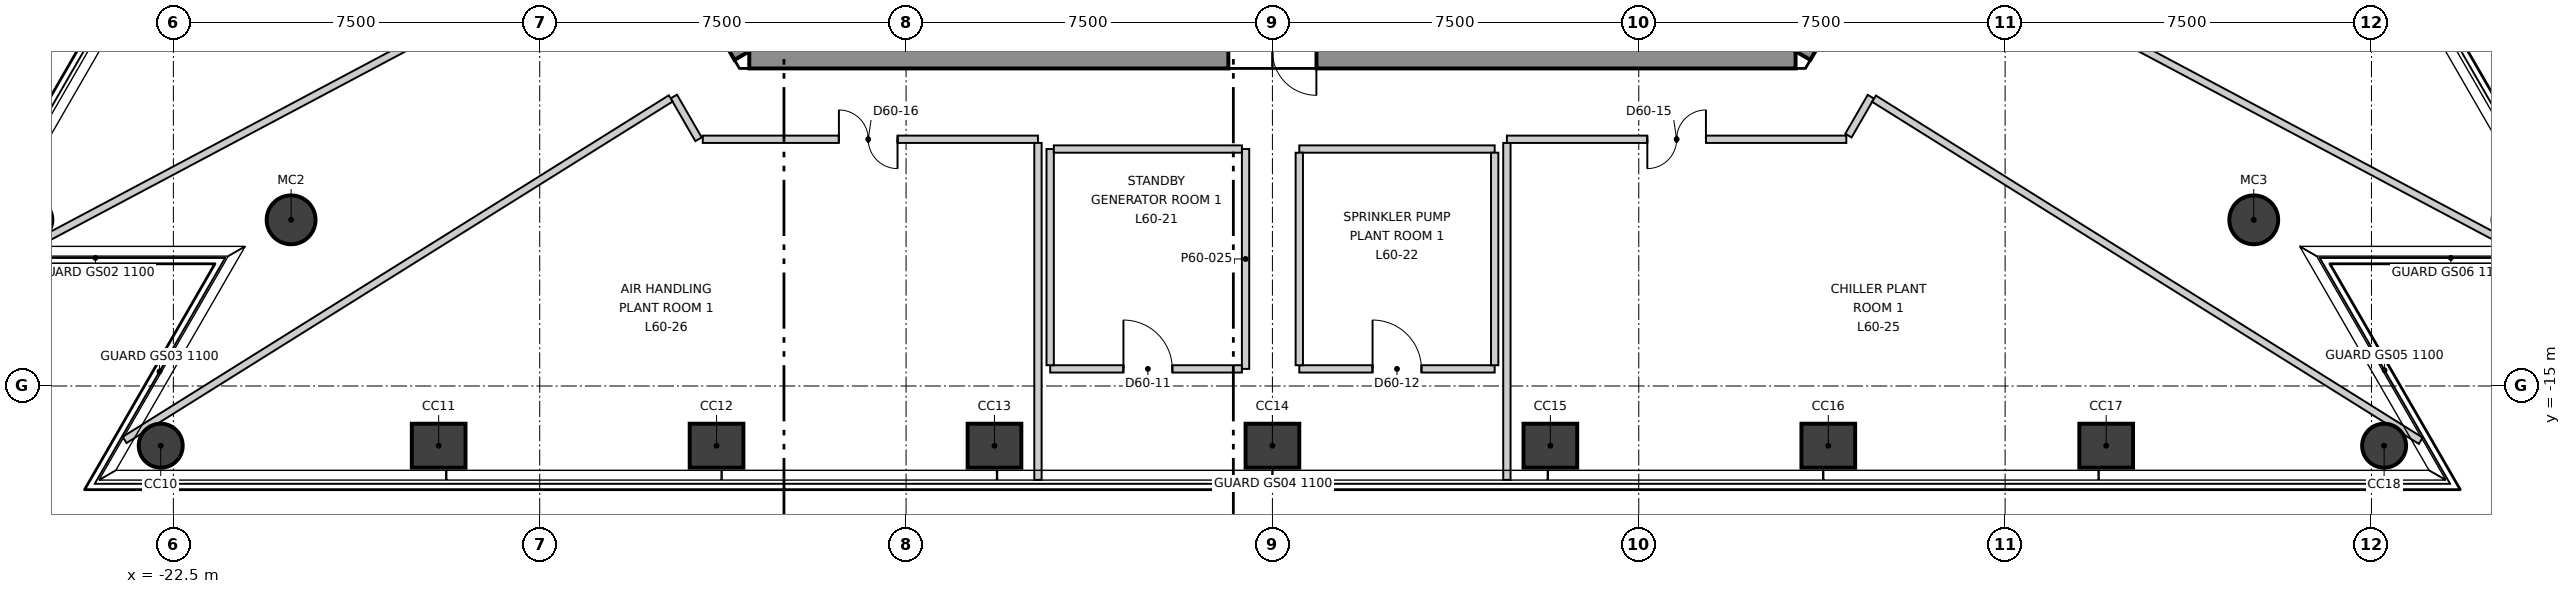
"""IFC4 building model, lengths in metres.
Left out: names, types, materials, properties, quantities, classifications, styles, units other than length and angle.
Written with IfcOpenShell. Run it as: python <this file> out.ifc"""

import sys

from ifc_helpers import new_model, si_unit, direction, frame, frame_2d, origin, origin_2d, place, context, subcontext, project, spatial, polyline, rectangle, circle, outline, extrude, element, fill, save


model = new_model("IFC4")
c1 = context("Model", 3, precision=1e-05, world=origin(), true_north=direction((0.0, 1.0)))
c2 = subcontext(c1, "Body", "Model", "MODEL_VIEW")
j1 = project(units=[si_unit("LENGTHUNIT", "METRE"), si_unit("PLANEANGLEUNIT", "RADIAN")], contexts=[c1])
p1 = place(None, origin())
s1 = spatial("IfcSite", under=j1, at=p1, CompositionType="ELEMENT")
p2 = place(p1, origin())
s2 = spatial("IfcBuilding", under=s1, at=p2, CompositionType="ELEMENT")
p3 = place(p2, frame((0.0, 0.0, 255.8)))
s3 = spatial("IfcBuildingStorey", under=s2, at=p3, CompositionType="ELEMENT", Elevation=255.8)
p4 = place(p3, frame((-12.413, -5.2, -0.6), z_axis=(0.0, 0.0, 1.0), x_axis=(0.49999337185, -0.866029230515, 0.0)))
e1 = element("IfcWall", 1, at=p4, inside=s3, PredefinedType="SHEAR", context=c2, shape_type="SweptSolid", body=[
    extrude(outline(polyline([(-0.202, -0.35), (1.703, -0.35), (3.608, -0.35), (3.204, 0.35), (1.703, 0.35), (0.202, 0.35), (-0.202, -0.35)])), origin(), (0.0, 0.0, 1.0), 6.3),
])
p5 = place(p4, frame((1.553, 0.0, 0.6)))
e2 = element("IfcOpeningElement", 2, at=p5, cuts=e1, PredefinedType="OPENING", context=c2, shape_type="SweptSolid", body=[
    extrude(rectangle(XDim=1.4, YDim=2.1, at=frame_2d((0.7, 1.05))), frame((0.0, 0.36, 0.0), z_axis=(0.0, -1.0, 0.0), x_axis=(1.0, 0.0, 0.0)), (0.0, 0.0, 1.0), 0.72),
])
p6 = place(p3, frame((-10.71, -8.15, -0.6), z_axis=(0.0, 0.0, 1.0), x_axis=(1.0, 0.0, 0.0)))
e3 = element("IfcWall", 3, at=p6, inside=s3, PredefinedType="SHEAR", context=c2, shape_type="SweptSolid", body=[
    extrude(outline(polyline([(-0.202, -0.35), (1.782, -0.35), (3.766, -0.35), (5.75, -0.35), (7.734, -0.35), (9.718, -0.35), (11.702, -0.35), (13.686, -0.35), (15.67, -0.35), (17.654, -0.35), (19.638, -0.35), (21.622, -0.35), (21.218, 0.35), (19.307, 0.35), (17.397, 0.35), (15.486, 0.35), (13.576, 0.35), (11.665, 0.35), (9.755, 0.35), (7.844, 0.35), (5.934, 0.35), (4.023, 0.35), (2.113, 0.35), (0.202, 0.35), (-0.202, -0.35)])), origin(), (0.0, 0.0, 1.0), 6.3),
])
p7 = place(p6, frame((9.81, 0.0, 0.6)))
e4 = element("IfcOpeningElement", 4, at=p7, cuts=e3, PredefinedType="OPENING", context=c2, shape_type="SweptSolid", body=[
    extrude(rectangle(XDim=1.8, YDim=2.1, at=frame_2d((0.9, 1.05))), frame((0.0, 0.36, 0.0), z_axis=(0.0, -1.0, 0.0), x_axis=(1.0, 0.0, 0.0)), (0.0, 0.0, 1.0), 0.72),
])
p8 = place(p3, frame((10.71, -8.15, -0.6), z_axis=(0.0, 0.0, 1.0), x_axis=(0.49999337185, 0.866029230515, 0.0)))
e5 = element("IfcWall", 5, at=p8, inside=s3, PredefinedType="SHEAR", context=c2, shape_type="SweptSolid", body=[
    extrude(outline(polyline([(-0.202, -0.35), (1.703, -0.35), (3.608, -0.35), (3.204, 0.35), (1.703, 0.35), (0.202, 0.35), (-0.202, -0.35)])), origin(), (0.0, 0.0, 1.0), 6.3),
])
p9 = place(p8, frame((1.553, 0.0, 0.6)))
e6 = element("IfcOpeningElement", 6, at=p9, cuts=e5, PredefinedType="OPENING", context=c2, shape_type="SweptSolid", body=[
    extrude(rectangle(XDim=1.4, YDim=2.1, at=frame_2d((0.7, 1.05))), frame((0.0, 0.36, 0.0), z_axis=(0.0, -1.0, 0.0), x_axis=(1.0, 0.0, 0.0)), (0.0, 0.0, 1.0), 0.72),
])
p10 = place(p3, frame((-22.759, -16.222, -0.6), z_axis=(0.0, 0.0, 1.0), x_axis=(1.0, 0.0, 0.0)))
e7 = element("IfcColumn", 7, at=p10, inside=s3, PredefinedType="COLUMN", context=c2, shape_type="SweptSolid", body=[
    extrude(circle(Radius=0.45, at=origin_2d()), origin(), (0.0, 0.0, 1.0), 6.3),
])
for number, where, z_axis, x_axis in (
    (8, (-17.069, -16.222, -0.6), (0.0, 0.0, 1.0), (1.0, 0.0, 0.0)),
    (9, (-11.38, -16.222, -0.6), (0.0, 0.0, 1.0), (1.0, 0.0, 0.0)),
    (10, (-5.69, -16.222, -0.6), (0.0, 0.0, 1.0), (1.0, 0.0, 0.0)),
    (11, (0.0, -16.222, -0.6), (0.0, 0.0, 1.0), (1.0, 0.0, 0.0)),
    (12, (5.69, -16.222, -0.6), (0.0, 0.0, 1.0), (1.0, 0.0, 0.0)),
    (13, (11.38, -16.222, -0.6), (0.0, 0.0, 1.0), (1.0, 0.0, 0.0)),
    (14, (17.069, -16.222, -0.6), (0.0, 0.0, 1.0), (1.0, 0.0, 0.0)),
):
    element("IfcColumn", number, at=place(p3, frame(where, z_axis=z_axis, x_axis=x_axis)), inside=s3, PredefinedType="COLUMN", context=c2, shape_type="SweptSolid", body=[
        extrude(rectangle(XDim=1.1, YDim=0.9, at=origin_2d()), origin(), (0.0, 0.0, 1.0), 6.3),
    ])
p11 = place(p3, frame((22.759, -16.222, -0.6), z_axis=(0.0, 0.0, 1.0), x_axis=(1.0, 0.0, 0.0)))
e15 = element("IfcColumn", 15, at=p11, inside=s3, PredefinedType="COLUMN", context=c2, shape_type="SweptSolid", body=[
    extrude(circle(Radius=0.45, at=origin_2d()), origin(), (0.0, 0.0, 1.0), 6.3),
])
for number, where, z_axis, x_axis in (
    (16, (-20.09, -11.599, -0.6), (0.0, 0.0, 1.0), (1.0, 0.0, 0.0)),
    (17, (20.09, -11.599, -0.6), (0.0, 0.0, 1.0), (1.0, 0.0, 0.0)),
):
    element("IfcColumn", number, at=place(p3, frame(where, z_axis=z_axis, x_axis=x_axis)), inside=s3, PredefinedType="COLUMN", context=c2, shape_type="SweptSolid", body=[
        extrude(circle(Radius=0.5, at=origin_2d()), origin(), (0.0, 0.0, 1.0), 6.3),
    ])
p12 = place(p3, frame((-12.254, -9.075, 0.0), z_axis=(0.0, 0.0, 1.0), x_axis=(0.499778243608, -0.866153397047, 0.0)))
e18 = element("IfcWall", 18, at=p12, inside=s3, PredefinedType="PARTITIONING", context=c2, shape_type="SweptSolid", body=[
    extrude(rectangle(XDim=1.01, YDim=0.15, at=frame_2d((0.505, 0.0))), origin(), (0.0, 0.0, 1.0), 5.7),
])
p13 = place(p3, frame((-25.716, -12.299, 0.0), z_axis=(0.0, 0.0, 1.0), x_axis=(0.883174126978, 0.469045265871, 0.0)))
e19 = element("IfcWall", 19, at=p13, inside=s3, PredefinedType="PARTITIONING", context=c2, shape_type="SweptSolid", body=[
    extrude(rectangle(XDim=13.204, YDim=0.15, at=frame_2d((6.602, 0.0))), origin(), (0.0, 0.0, 1.0), 5.1),
])
p14 = place(p3, frame((-23.499, -16.104, 0.0), z_axis=(0.0, 0.0, 1.0), x_axis=(0.847932766804, 0.530103785103, 0.0)))
e20 = element("IfcWall", 20, at=p14, inside=s3, PredefinedType="PARTITIONING", context=c2, shape_type="SweptSolid", body=[
    extrude(rectangle(XDim=13.186, YDim=0.15, at=frame_2d((6.593, 0.0))), origin(), (0.0, 0.0, 1.0), 5.1),
])
p15 = place(p3, frame((-11.662, -9.95, 0.0), z_axis=(0.0, 0.0, 1.0), x_axis=(1.0, 0.0, 0.0)))
e21 = element("IfcWall", 21, at=p15, inside=s3, PredefinedType="PARTITIONING", context=c2, shape_type="SweptSolid", body=[
    extrude(rectangle(XDim=6.862, YDim=0.15, at=frame_2d((3.431, 0.0))), origin(), (0.0, 0.0, 1.0), 5.7),
])
p16 = place(p15, frame((2.787, 0.0, 0.0)))
e22 = element("IfcOpeningElement", 22, at=p16, cuts=e21, PredefinedType="OPENING", context=c2, shape_type="SweptSolid", body=[
    extrude(rectangle(XDim=1.2, YDim=2.1, at=frame_2d((0.6, 1.05))), frame((0.0, 0.085, 0.0), z_axis=(0.0, -1.0, 0.0), x_axis=(1.0, 0.0, 0.0)), (0.0, 0.0, 1.0), 0.17),
])
p17 = place(p3, frame((4.8, -9.95, 0.0), z_axis=(0.0, 0.0, 1.0), x_axis=(1.0, 0.0, 0.0)))
e23 = element("IfcWall", 23, at=p17, inside=s3, PredefinedType="PARTITIONING", context=c2, shape_type="SweptSolid", body=[
    extrude(rectangle(XDim=6.949, YDim=0.15, at=frame_2d((3.475, 0.0))), origin(), (0.0, 0.0, 1.0), 5.7),
])
p18 = place(p17, frame((2.875, 0.0, 0.0)))
e24 = element("IfcOpeningElement", 24, at=p18, cuts=e23, PredefinedType="OPENING", context=c2, shape_type="SweptSolid", body=[
    extrude(rectangle(XDim=1.2, YDim=2.1, at=frame_2d((0.6, 1.05))), frame((0.0, 0.085, 0.0), z_axis=(0.0, -1.0, 0.0), x_axis=(1.0, 0.0, 0.0)), (0.0, 0.0, 1.0), 0.17),
])
for number, where, z_axis, x_axis in (
    (25, (-4.8, -16.922, 0.0), (0.0, 0.0, 1.0), (0.0, 1.0, 0.0)),
    (26, (4.8, -16.922, 0.0), (0.0, 0.0, 1.0), (0.0, 1.0, 0.0)),
):
    element("IfcWall", number, at=place(p3, frame(where, z_axis=z_axis, x_axis=x_axis)), inside=s3, PredefinedType="PARTITIONING", context=c2, shape_type="SweptSolid", body=[
        extrude(rectangle(XDim=6.897, YDim=0.15, at=frame_2d((3.449, 0.0))), origin(), (0.0, 0.0, 1.0), 5.7),
    ])
p19 = place(p3, frame((11.792, -9.875, 0.0), z_axis=(0.0, 0.0, 1.0), x_axis=(0.500366091518, 0.865813937552, 0.0)))
e27 = element("IfcWall", 27, at=p19, inside=s3, PredefinedType="PARTITIONING", context=c2, shape_type="SweptSolid", body=[
    extrude(rectangle(XDim=0.919, YDim=0.15, at=frame_2d((0.459, 0.0))), origin(), (0.0, 0.0, 1.0), 5.7),
])
p20 = place(p3, frame((12.316, -9.119, 0.0), z_axis=(0.0, 0.0, 1.0), x_axis=(0.847776956151, -0.53035293213, 0.0)))
e28 = element("IfcWall", 28, at=p20, inside=s3, PredefinedType="PARTITIONING", context=c2, shape_type="SweptSolid", body=[
    extrude(rectangle(XDim=13.203, YDim=0.15, at=frame_2d((6.602, 0.0))), origin(), (0.0, 0.0, 1.0), 5.1),
])
p21 = place(p3, frame((14.053, -6.11, 0.0), z_axis=(0.0, 0.0, 1.0), x_axis=(0.883019336408, -0.469336607916, 0.0)))
e29 = element("IfcWall", 29, at=p21, inside=s3, PredefinedType="PARTITIONING", context=c2, shape_type="SweptSolid", body=[
    extrude(rectangle(XDim=13.187, YDim=0.15, at=frame_2d((6.593, 0.0))), origin(), (0.0, 0.0, 1.0), 5.1),
])
p22 = place(p3, frame((-0.55, -14.65, 0.0), z_axis=(0.0, 0.0, 1.0), x_axis=(0.0, 1.0, 0.0)))
e30 = element("IfcWall", 30, at=p22, inside=s3, PredefinedType="PARTITIONING", context=c2, shape_type="SweptSolid", body=[
    extrude(rectangle(XDim=4.5, YDim=0.15, at=frame_2d((2.25, 0.0))), origin(), (0.0, 0.0, 1.0), 5.7),
])
p23 = place(p3, frame((-4.55, -14.65, 0.0), z_axis=(0.0, 0.0, 1.0), x_axis=(1.0, 0.0, 0.0)))
e31 = element("IfcWall", 31, at=p23, inside=s3, PredefinedType="PARTITIONING", context=c2, shape_type="SweptSolid", body=[
    extrude(rectangle(XDim=3.925, YDim=0.15, at=frame_2d((1.962, 0.0))), origin(), (0.0, 0.0, 1.0), 5.7),
])
p24 = place(p23, frame((1.5, 0.0, 0.0)))
e32 = element("IfcOpeningElement", 32, at=p24, cuts=e31, PredefinedType="OPENING", context=c2, shape_type="SweptSolid", body=[
    extrude(rectangle(XDim=1.0, YDim=2.1, at=frame_2d((0.5, 1.05))), frame((0.0, 0.085, 0.0), z_axis=(0.0, -1.0, 0.0), x_axis=(1.0, 0.0, 0.0)), (0.0, 0.0, 1.0), 0.17),
])
p25 = place(p3, frame((0.55, -14.65, 0.0), z_axis=(0.0, 0.0, 1.0), x_axis=(1.0, 0.0, 0.0)))
e33 = element("IfcWall", 33, at=p25, inside=s3, PredefinedType="PARTITIONING", context=c2, shape_type="SweptSolid", body=[
    extrude(rectangle(XDim=4.0, YDim=0.15, at=frame_2d((2.0, 0.0))), origin(), (0.0, 0.0, 1.0), 5.7),
])
p26 = place(p25, frame((1.5, 0.0, 0.0)))
e34 = element("IfcOpeningElement", 34, at=p26, cuts=e33, PredefinedType="OPENING", context=c2, shape_type="SweptSolid", body=[
    extrude(rectangle(XDim=1.0, YDim=2.1, at=frame_2d((0.5, 1.05))), frame((0.0, 0.085, 0.0), z_axis=(0.0, -1.0, 0.0), x_axis=(1.0, 0.0, 0.0)), (0.0, 0.0, 1.0), 0.17),
])
p27 = place(p3, frame((-4.55, -14.575, 0.0), z_axis=(0.0, 0.0, 1.0), x_axis=(0.0, 1.0, 0.0)))
e35 = element("IfcWall", 35, at=p27, inside=s3, PredefinedType="PARTITIONING", context=c2, shape_type="SweptSolid", body=[
    extrude(rectangle(XDim=4.425, YDim=0.15, at=frame_2d((2.212, 0.0))), origin(), (0.0, 0.0, 1.0), 5.7),
])
p28 = place(p3, frame((-4.475, -10.15, 0.0), z_axis=(0.0, 0.0, 1.0), x_axis=(1.0, 0.0, 0.0)))
e36 = element("IfcWall", 36, at=p28, inside=s3, PredefinedType="PARTITIONING", context=c2, shape_type="SweptSolid", body=[
    extrude(rectangle(XDim=3.85, YDim=0.15, at=frame_2d((1.925, 0.0))), origin(), (0.0, 0.0, 1.0), 5.7),
])
p29 = place(p3, frame((0.55, -10.15, 0.0), z_axis=(0.0, 0.0, 1.0), x_axis=(1.0, 0.0, 0.0)))
e37 = element("IfcWall", 37, at=p29, inside=s3, PredefinedType="PARTITIONING", context=c2, shape_type="SweptSolid", body=[
    extrude(rectangle(XDim=4.0, YDim=0.15, at=frame_2d((2.0, 0.0))), origin(), (0.0, 0.0, 1.0), 5.7),
])
for number, where, z_axis, x_axis in (
    (38, (0.55, -14.575, 0.0), (0.0, 0.0, 1.0), (0.0, 1.0, 0.0)),
    (39, (4.55, -14.575, 0.0), (0.0, 0.0, 1.0), (0.0, 1.0, 0.0)),
):
    element("IfcWall", number, at=place(p3, frame(where, z_axis=z_axis, x_axis=x_axis)), inside=s3, PredefinedType="PARTITIONING", context=c2, shape_type="SweptSolid", body=[
        extrude(rectangle(XDim=4.35, YDim=0.15, at=frame_2d((2.175, 0.0))), origin(), (0.0, 0.0, 1.0), 5.7),
    ])
p30 = place(p24, origin())
e40 = element("IfcDoor", 40, at=p30, inside=s3, OperationType="SINGLE_SWING_RIGHT", PredefinedType="DOOR", context=c2, shape_type="SweptSolid", body=[
    extrude(rectangle(XDim=1.0, YDim=2.1, at=frame_2d((0.5, 1.05))), frame((0.0, 0.025, 0.0), z_axis=(0.0, -1.0, 0.0), x_axis=(1.0, 0.0, 0.0)), (0.0, 0.0, 1.0), 0.05),
])
fill(e32, e40)
p31 = place(p26, origin())
e41 = element("IfcDoor", 41, at=p31, inside=s3, OperationType="SINGLE_SWING_RIGHT", PredefinedType="DOOR", context=c2, shape_type="SweptSolid", body=[
    extrude(rectangle(XDim=1.0, YDim=2.1, at=frame_2d((0.5, 1.05))), frame((0.0, 0.025, 0.0), z_axis=(0.0, -1.0, 0.0), x_axis=(1.0, 0.0, 0.0)), (0.0, 0.0, 1.0), 0.05),
])
fill(e34, e41)
p32 = place(p18, origin())
e42 = element("IfcDoor", 42, at=p32, inside=s3, OperationType="DOUBLE_DOOR_SINGLE_SWING", PredefinedType="DOOR", context=c2, shape_type="SweptSolid", body=[
    extrude(rectangle(XDim=1.2, YDim=2.1, at=frame_2d((0.6, 1.05))), frame((0.0, 0.025, 0.0), z_axis=(0.0, -1.0, 0.0), x_axis=(1.0, 0.0, 0.0)), (0.0, 0.0, 1.0), 0.05),
])
fill(e24, e42)
p33 = place(p16, origin())
e43 = element("IfcDoor", 43, at=p33, inside=s3, OperationType="DOUBLE_DOOR_SINGLE_SWING", PredefinedType="DOOR", context=c2, shape_type="SweptSolid", body=[
    extrude(rectangle(XDim=1.2, YDim=2.1, at=frame_2d((0.6, 1.05))), frame((0.0, 0.025, 0.0), z_axis=(0.0, -1.0, 0.0), x_axis=(1.0, 0.0, 0.0)), (0.0, 0.0, 1.0), 0.05),
])
fill(e22, e43)
save(model, sys.argv[1])
